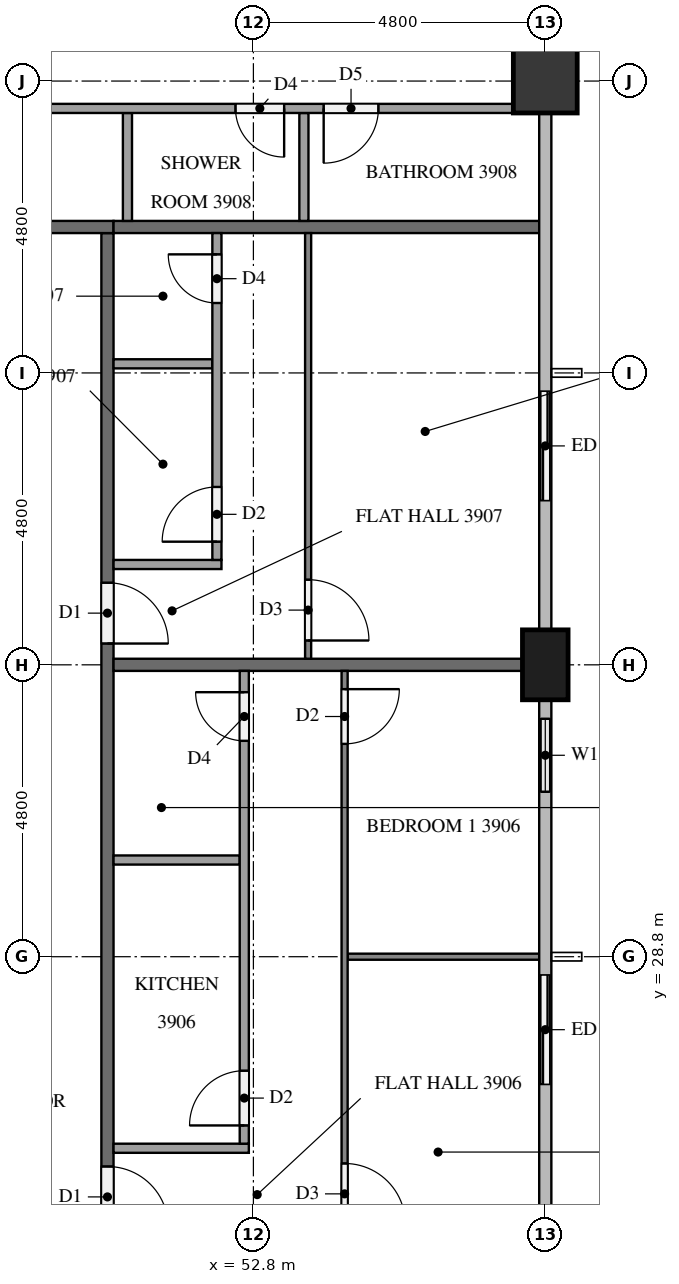
"""IFC4 building model, lengths in metres.
Left out: names, types, materials, properties, quantities, classifications, styles, units other than length and angle.
Written with IfcOpenShell. Run it as: python <this file> out.ifc"""

import sys

from ifc_helpers import new_model, si_unit, direction, frame, frame_2d, origin, origin_2d, place, context, subcontext, project, spatial, rectangle, extrude, element, fill, save


model = new_model("IFC4")
c1 = context("Model", 3, precision=1e-05, world=origin(), true_north=direction((0.0, 1.0)))
c2 = subcontext(c1, "Body", "Model", "MODEL_VIEW")
j1 = project(units=[si_unit("LENGTHUNIT", "METRE"), si_unit("PLANEANGLEUNIT", "RADIAN")], contexts=[c1])
p1 = place(None, origin())
s1 = spatial("IfcSite", under=j1, at=p1, CompositionType="ELEMENT")
p2 = place(p1, origin())
s2 = spatial("IfcBuilding", under=s1, at=p2, CompositionType="ELEMENT")
p3 = place(p2, frame((0.0, 0.0, 152.5)))
s3 = spatial("IfcBuildingStorey", under=s2, at=p3, CompositionType="ELEMENT", Elevation=152.5)
p4 = place(p3, frame((57.6, 33.6, 0.0), z_axis=(0.0, 0.0, 1.0), x_axis=(0.0, 1.0, 0.0)))
e1 = element("IfcColumn", 1, at=p4, inside=s3, PredefinedType="COLUMN", context=c2, shape_type="SweptSolid", body=[
    extrude(rectangle(XDim=1.15, YDim=0.75, at=origin_2d()), origin(), (0.0, 0.0, 1.0), 3.2),
])
p5 = place(p3, frame((57.6, 43.2, 0.0), z_axis=(0.0, 0.0, 1.0), x_axis=(1.0, 0.0, 0.0)))
e2 = element("IfcColumn", 2, at=p5, inside=s3, PredefinedType="COLUMN", context=c2, shape_type="SweptSolid", body=[
    extrude(rectangle(XDim=1.05, YDim=1.05, at=origin_2d()), origin(), (0.0, 0.0, 1.0), 3.2),
])
p6 = place(p3, frame((57.6, 26.4, 0.0), z_axis=(0.0, 0.0, 1.0), x_axis=(0.0, 1.0, 0.0)))
e3 = element("IfcWall", 3, at=p6, inside=s3, PredefinedType="SOLIDWALL", context=c2, shape_type="SweptSolid", body=[
    extrude(rectangle(XDim=2.4, YDim=0.15, at=frame_2d((1.2, 0.0))), origin(), (0.0, 0.0, 1.0), 3.2),
])
p7 = place(p6, frame((0.3, 0.0, 0.0)))
e4 = element("IfcOpeningElement", 4, at=p7, cuts=e3, PredefinedType="OPENING", context=c2, shape_type="SweptSolid", body=[
    extrude(rectangle(XDim=1.8, YDim=2.4, at=frame_2d((0.9, 1.2))), frame((0.0, 0.085, 0.0), z_axis=(0.0, -1.0, 0.0), x_axis=(1.0, 0.0, 0.0)), (0.0, 0.0, 1.0), 0.17),
])
p8 = place(p3, frame((57.6, 31.2, 0.0), z_axis=(0.0, 0.0, 1.0), x_axis=(0.0, 1.0, 0.0)))
e5 = element("IfcWall", 5, at=p8, inside=s3, PredefinedType="SOLIDWALL", context=c2, shape_type="SweptSolid", body=[
    extrude(rectangle(XDim=1.825, YDim=0.15, at=frame_2d((0.913, 0.0))), origin(), (0.0, 0.0, 1.0), 3.2),
])
p9 = place(p8, frame((0.312, 0.0, 0.9)))
e6 = element("IfcOpeningElement", 6, at=p9, cuts=e5, PredefinedType="OPENING", context=c2, shape_type="SweptSolid", body=[
    extrude(rectangle(XDim=1.2, YDim=1.4, at=frame_2d((0.6, 0.7))), frame((0.0, 0.085, 0.0), z_axis=(0.0, -1.0, 0.0), x_axis=(1.0, 0.0, 0.0)), (0.0, 0.0, 1.0), 0.17),
])
p10 = place(p3, frame((57.6, 36.0, 0.0), z_axis=(0.0, 0.0, 1.0), x_axis=(0.0, 1.0, 0.0)))
e7 = element("IfcWall", 7, at=p10, inside=s3, PredefinedType="SOLIDWALL", context=c2, shape_type="SweptSolid", body=[
    extrude(rectangle(XDim=2.4, YDim=0.15, at=frame_2d((1.2, 0.0))), origin(), (0.0, 0.0, 1.0), 3.2),
])
p11 = place(p10, frame((0.3, 0.0, 0.0)))
e8 = element("IfcOpeningElement", 8, at=p11, cuts=e7, PredefinedType="OPENING", context=c2, shape_type="SweptSolid", body=[
    extrude(rectangle(XDim=1.8, YDim=2.4, at=frame_2d((0.9, 1.2))), frame((0.0, 0.085, 0.0), z_axis=(0.0, -1.0, 0.0), x_axis=(1.0, 0.0, 0.0)), (0.0, 0.0, 1.0), 0.17),
])
p12 = place(p3, frame((50.4, 40.7, 0.0), z_axis=(0.0, 0.0, 1.0), x_axis=(0.0, -1.0, 0.0)))
e9 = element("IfcWall", 9, at=p12, inside=s3, PredefinedType="PARTITIONING", context=c2, shape_type="SweptSolid", body=[
    extrude(rectangle(XDim=28.6, YDim=0.2, at=frame_2d((14.3, 0.0))), origin(), (0.0, 0.0, 1.0), 3.2),
])
p13 = place(p12, frame((17.05, 0.0, 0.0)))
e10 = element("IfcOpeningElement", 10, at=p13, cuts=e9, PredefinedType="OPENING", context=c2, shape_type="SweptSolid", body=[
    extrude(rectangle(XDim=1.0, YDim=2.1, at=frame_2d((0.5, 1.05))), frame((0.0, 0.11, 0.0), z_axis=(0.0, -1.0, 0.0), x_axis=(1.0, 0.0, 0.0)), (0.0, 0.0, 1.0), 0.22),
])
p14 = place(p12, frame((15.35, 0.0, 0.0)))
e11 = element("IfcOpeningElement", 11, at=p14, cuts=e9, PredefinedType="OPENING", context=c2, shape_type="SweptSolid", body=[
    extrude(rectangle(XDim=1.0, YDim=2.1, at=frame_2d((0.5, 1.05))), frame((0.0, 0.11, 0.0), z_axis=(0.0, -1.0, 0.0), x_axis=(1.0, 0.0, 0.0)), (0.0, 0.0, 1.0), 0.22),
])
p15 = place(p12, frame((5.75, 0.0, 0.0)))
e12 = element("IfcOpeningElement", 12, at=p15, cuts=e9, PredefinedType="OPENING", context=c2, shape_type="SweptSolid", body=[
    extrude(rectangle(XDim=1.0, YDim=2.1, at=frame_2d((0.5, 1.05))), frame((0.0, 0.11, 0.0), z_axis=(0.0, -1.0, 0.0), x_axis=(1.0, 0.0, 0.0)), (0.0, 0.0, 1.0), 0.22),
])
p16 = place(p3, frame((11.9, 40.8, 0.0), z_axis=(0.0, 0.0, 1.0), x_axis=(1.0, 0.0, 0.0)))
e13 = element("IfcWall", 13, at=p16, inside=s3, PredefinedType="PARTITIONING", context=c2, shape_type="SweptSolid", body=[
    extrude(rectangle(XDim=38.6, YDim=0.2, at=frame_2d((19.3, 0.0))), origin(), (0.0, 0.0, 1.0), 3.2),
])
p17 = place(p16, frame((31.65, 0.0, 0.0)))
e14 = element("IfcOpeningElement", 14, at=p17, cuts=e13, PredefinedType="OPENING", context=c2, shape_type="SweptSolid", body=[
    extrude(rectangle(XDim=1.0, YDim=2.1, at=frame_2d((0.5, 1.05))), frame((0.0, 0.11, 0.0), z_axis=(0.0, -1.0, 0.0), x_axis=(1.0, 0.0, 0.0)), (0.0, 0.0, 1.0), 0.22),
])
p18 = place(p16, frame((29.95, 0.0, 0.0)))
e15 = element("IfcOpeningElement", 15, at=p18, cuts=e13, PredefinedType="OPENING", context=c2, shape_type="SweptSolid", body=[
    extrude(rectangle(XDim=1.0, YDim=2.1, at=frame_2d((0.5, 1.05))), frame((0.0, 0.11, 0.0), z_axis=(0.0, -1.0, 0.0), x_axis=(1.0, 0.0, 0.0)), (0.0, 0.0, 1.0), 0.22),
])
p19 = place(p16, frame((15.55, 0.0, 0.0)))
e16 = element("IfcOpeningElement", 16, at=p19, cuts=e13, PredefinedType="OPENING", context=c2, shape_type="SweptSolid", body=[
    extrude(rectangle(XDim=1.0, YDim=2.1, at=frame_2d((0.5, 1.05))), frame((0.0, 0.11, 0.0), z_axis=(0.0, -1.0, 0.0), x_axis=(1.0, 0.0, 0.0)), (0.0, 0.0, 1.0), 0.22),
])
p20 = place(p16, frame((1.15, 0.0, 0.0)))
e17 = element("IfcOpeningElement", 17, at=p20, cuts=e13, PredefinedType="OPENING", context=c2, shape_type="SweptSolid", body=[
    extrude(rectangle(XDim=1.0, YDim=2.1, at=frame_2d((0.5, 1.05))), frame((0.0, 0.11, 0.0), z_axis=(0.0, -1.0, 0.0), x_axis=(1.0, 0.0, 0.0)), (0.0, 0.0, 1.0), 0.22),
])
p21 = place(p3, frame((50.5, 33.6, 0.0), z_axis=(0.0, 0.0, 1.0), x_axis=(1.0, 0.0, 0.0)))
e18 = element("IfcWall", 18, at=p21, inside=s3, PredefinedType="PARTITIONING", context=c2, shape_type="SweptSolid", body=[
    extrude(rectangle(XDim=6.725, YDim=0.2, at=frame_2d((3.363, 0.0))), origin(), (0.0, 0.0, 1.0), 3.2),
])
p22 = place(p3, frame((50.5, 40.8, 0.0), z_axis=(0.0, 0.0, 1.0), x_axis=(1.0, 0.0, 0.0)))
e19 = element("IfcWall", 19, at=p22, inside=s3, PredefinedType="PARTITIONING", context=c2, shape_type="SweptSolid", body=[
    extrude(rectangle(XDim=7.0, YDim=0.2, at=frame_2d((3.5, 0.0))), origin(), (0.0, 0.0, 1.0), 3.2),
])
p23 = place(p3, frame((54.35, 28.8, 0.0), z_axis=(0.0, 0.0, 1.0), x_axis=(1.0, 0.0, 0.0)))
e20 = element("IfcWall", 20, at=p23, inside=s3, PredefinedType="PARTITIONING", context=c2, shape_type="SweptSolid", body=[
    extrude(rectangle(XDim=3.15, YDim=0.1, at=frame_2d((1.575, 0.0))), origin(), (0.0, 0.0, 1.0), 3.2),
])
p24 = place(p3, frame((54.3, 33.5, 0.0), z_axis=(0.0, 0.0, 1.0), x_axis=(0.0, -1.0, 0.0)))
e21 = element("IfcWall", 21, at=p24, inside=s3, PredefinedType="PARTITIONING", context=c2, shape_type="SweptSolid", body=[
    extrude(rectangle(XDim=9.4, YDim=0.1, at=frame_2d((4.7, 0.0))), origin(), (0.0, 0.0, 1.0), 3.2),
])
p25 = place(p24, frame((8.1, 0.0, 0.0)))
e22 = element("IfcOpeningElement", 22, at=p25, cuts=e21, PredefinedType="OPENING", context=c2, shape_type="SweptSolid", body=[
    extrude(rectangle(XDim=1.0, YDim=2.1, at=frame_2d((0.5, 1.05))), frame((0.0, 0.06, 0.0), z_axis=(0.0, -1.0, 0.0), x_axis=(1.0, 0.0, 0.0)), (0.0, 0.0, 1.0), 0.12),
])
p26 = place(p24, frame((0.3, 0.0, 0.0)))
e23 = element("IfcOpeningElement", 23, at=p26, cuts=e21, PredefinedType="OPENING", context=c2, shape_type="SweptSolid", body=[
    extrude(rectangle(XDim=0.9, YDim=2.1, at=frame_2d((0.45, 1.05))), frame((0.0, 0.06, 0.0), z_axis=(0.0, -1.0, 0.0), x_axis=(1.0, 0.0, 0.0)), (0.0, 0.0, 1.0), 0.12),
])
p27 = place(p3, frame((50.5, 30.39, 0.0), z_axis=(0.0, 0.0, 1.0), x_axis=(1.0, 0.0, 0.0)))
e24 = element("IfcWall", 24, at=p27, inside=s3, PredefinedType="PARTITIONING", context=c2, shape_type="SweptSolid", body=[
    extrude(rectangle(XDim=2.075, YDim=0.15, at=frame_2d((1.038, 0.0))), origin(), (0.0, 0.0, 1.0), 3.2),
])
p28 = place(p3, frame((50.5, 25.65, 0.0), z_axis=(0.0, 0.0, 1.0), x_axis=(1.0, 0.0, 0.0)))
e25 = element("IfcWall", 25, at=p28, inside=s3, PredefinedType="PARTITIONING", context=c2, shape_type="SweptSolid", body=[
    extrude(rectangle(XDim=2.225, YDim=0.15, at=frame_2d((1.113, 0.0))), origin(), (0.0, 0.0, 1.0), 3.2),
])
p29 = place(p3, frame((52.65, 25.725, 0.0), z_axis=(0.0, 0.0, 1.0), x_axis=(0.0, 1.0, 0.0)))
e26 = element("IfcWall", 26, at=p29, inside=s3, PredefinedType="PARTITIONING", context=c2, shape_type="SweptSolid", body=[
    extrude(rectangle(XDim=7.775, YDim=0.15, at=frame_2d((3.887, 0.0))), origin(), (0.0, 0.0, 1.0), 3.2),
])
p30 = place(p29, frame((0.3, 0.0, 0.0)))
e27 = element("IfcOpeningElement", 27, at=p30, cuts=e26, PredefinedType="OPENING", context=c2, shape_type="SweptSolid", body=[
    extrude(rectangle(XDim=0.9, YDim=2.1, at=frame_2d((0.45, 1.05))), frame((0.0, 0.085, 0.0), z_axis=(0.0, -1.0, 0.0), x_axis=(1.0, 0.0, 0.0)), (0.0, 0.0, 1.0), 0.17),
])
p31 = place(p29, frame((6.625, 0.0, 0.0)))
e28 = element("IfcOpeningElement", 28, at=p31, cuts=e26, PredefinedType="OPENING", context=c2, shape_type="SweptSolid", body=[
    extrude(rectangle(XDim=0.8, YDim=2.1, at=frame_2d((0.4, 1.05))), frame((0.0, 0.085, 0.0), z_axis=(0.0, -1.0, 0.0), x_axis=(1.0, 0.0, 0.0)), (0.0, 0.0, 1.0), 0.17),
])
p32 = place(p3, frame((53.7, 40.7, 0.0), z_axis=(0.0, 0.0, 1.0), x_axis=(0.0, -1.0, 0.0)))
e29 = element("IfcWall", 29, at=p32, inside=s3, PredefinedType="PARTITIONING", context=c2, shape_type="SweptSolid", body=[
    extrude(rectangle(XDim=7.0, YDim=0.1, at=frame_2d((3.5, 0.0))), origin(), (0.0, 0.0, 1.0), 3.2),
])
p33 = place(p32, frame((5.7, 0.0, 0.0)))
e30 = element("IfcOpeningElement", 30, at=p33, cuts=e29, PredefinedType="OPENING", context=c2, shape_type="SweptSolid", body=[
    extrude(rectangle(XDim=1.0, YDim=2.1, at=frame_2d((0.5, 1.05))), frame((0.0, 0.06, 0.0), z_axis=(0.0, -1.0, 0.0), x_axis=(1.0, 0.0, 0.0)), (0.0, 0.0, 1.0), 0.12),
])
p34 = place(p3, frame((50.5, 38.55, 0.0), z_axis=(0.0, 0.0, 1.0), x_axis=(1.0, 0.0, 0.0)))
e31 = element("IfcWall", 31, at=p34, inside=s3, PredefinedType="PARTITIONING", context=c2, shape_type="SweptSolid", body=[
    extrude(rectangle(XDim=1.625, YDim=0.15, at=frame_2d((0.812, 0.0))), origin(), (0.0, 0.0, 1.0), 3.2),
])
p35 = place(p3, frame((50.5, 35.25, 0.0), z_axis=(0.0, 0.0, 1.0), x_axis=(1.0, 0.0, 0.0)))
e32 = element("IfcWall", 32, at=p35, inside=s3, PredefinedType="PARTITIONING", context=c2, shape_type="SweptSolid", body=[
    extrude(rectangle(XDim=1.775, YDim=0.15, at=frame_2d((0.887, 0.0))), origin(), (0.0, 0.0, 1.0), 3.2),
])
p36 = place(p3, frame((52.2, 35.325, 0.0), z_axis=(0.0, 0.0, 1.0), x_axis=(0.0, 1.0, 0.0)))
e33 = element("IfcWall", 33, at=p36, inside=s3, PredefinedType="PARTITIONING", context=c2, shape_type="SweptSolid", body=[
    extrude(rectangle(XDim=5.375, YDim=0.15, at=frame_2d((2.688, 0.0))), origin(), (0.0, 0.0, 1.0), 3.2),
])
p37 = place(p36, frame((0.3, 0.0, 0.0)))
e34 = element("IfcOpeningElement", 34, at=p37, cuts=e33, PredefinedType="OPENING", context=c2, shape_type="SweptSolid", body=[
    extrude(rectangle(XDim=0.9, YDim=2.1, at=frame_2d((0.45, 1.05))), frame((0.0, 0.085, 0.0), z_axis=(0.0, -1.0, 0.0), x_axis=(1.0, 0.0, 0.0)), (0.0, 0.0, 1.0), 0.17),
])
p38 = place(p36, frame((4.225, 0.0, 0.0)))
e35 = element("IfcOpeningElement", 35, at=p38, cuts=e33, PredefinedType="OPENING", context=c2, shape_type="SweptSolid", body=[
    extrude(rectangle(XDim=0.8, YDim=2.1, at=frame_2d((0.4, 1.05))), frame((0.0, 0.085, 0.0), z_axis=(0.0, -1.0, 0.0), x_axis=(1.0, 0.0, 0.0)), (0.0, 0.0, 1.0), 0.17),
])
for number, where, z_axis, x_axis in (
    (36, (50.729, 40.9, 0.0), (0.0, 0.0, 1.0), (0.0, 1.0, 0.0)),
    (37, (53.631, 40.9, 0.0), (0.0, 0.0, 1.0), (0.0, 1.0, 0.0)),
):
    element("IfcWall", number, at=place(p3, frame(where, z_axis=z_axis, x_axis=x_axis)), inside=s3, PredefinedType="PARTITIONING", context=c2, shape_type="SweptSolid", body=[
        extrude(rectangle(XDim=1.775, YDim=0.15, at=frame_2d((0.888, 0.0))), origin(), (0.0, 0.0, 1.0), 3.2),
    ])
p39 = place(p3, frame((57.075, 42.75, 0.0), z_axis=(0.0, 0.0, 1.0), x_axis=(-1.0, 0.0, 0.0)))
e38 = element("IfcWall", 38, at=p39, inside=s3, PredefinedType="PARTITIONING", context=c2, shape_type="SweptSolid", body=[
    extrude(rectangle(XDim=12.15, YDim=0.15, at=frame_2d((6.075, 0.0))), origin(), (0.0, 0.0, 1.0), 3.2),
])
p40 = place(p39, frame((10.95, 0.0, 0.0)))
e39 = element("IfcOpeningElement", 39, at=p40, cuts=e38, PredefinedType="OPENING", context=c2, shape_type="SweptSolid", body=[
    extrude(rectangle(XDim=0.9, YDim=2.1, at=frame_2d((0.45, 1.05))), frame((0.0, 0.085, 0.0), z_axis=(0.0, -1.0, 0.0), x_axis=(1.0, 0.0, 0.0)), (0.0, 0.0, 1.0), 0.17),
])
p41 = place(p39, frame((3.769, 0.0, 0.0)))
e40 = element("IfcOpeningElement", 40, at=p41, cuts=e38, PredefinedType="OPENING", context=c2, shape_type="SweptSolid", body=[
    extrude(rectangle(XDim=0.8, YDim=2.1, at=frame_2d((0.4, 1.05))), frame((0.0, 0.085, 0.0), z_axis=(0.0, -1.0, 0.0), x_axis=(1.0, 0.0, 0.0)), (0.0, 0.0, 1.0), 0.17),
])
p42 = place(p39, frame((2.219, 0.0, 0.0)))
e41 = element("IfcOpeningElement", 41, at=p42, cuts=e38, PredefinedType="OPENING", context=c2, shape_type="SweptSolid", body=[
    extrude(rectangle(XDim=0.9, YDim=2.1, at=frame_2d((0.45, 1.05))), frame((0.0, 0.085, 0.0), z_axis=(0.0, -1.0, 0.0), x_axis=(1.0, 0.0, 0.0)), (0.0, 0.0, 1.0), 0.17),
])
p43 = place(p7, origin())
e42 = element("IfcDoor", 42, at=p43, inside=s3, OperationType="SLIDING_TO_RIGHT", PredefinedType="DOOR", context=c2, shape_type="SweptSolid", body=[
    extrude(rectangle(XDim=1.8, YDim=2.4, at=frame_2d((0.9, 1.2))), frame((0.0, 0.025, 0.0), z_axis=(0.0, -1.0, 0.0), x_axis=(1.0, 0.0, 0.0)), (0.0, 0.0, 1.0), 0.05),
])
fill(e4, e42)
p44 = place(p9, origin())
e43 = element("IfcWindow", 43, at=p44, inside=s3, PartitioningType="SINGLE_PANEL", PredefinedType="WINDOW", context=c2, shape_type="SweptSolid", body=[
    extrude(rectangle(XDim=1.2, YDim=1.4, at=frame_2d((0.6, 0.7))), frame((0.0, 0.03, 0.0), z_axis=(0.0, -1.0, 0.0), x_axis=(1.0, 0.0, 0.0)), (0.0, 0.0, 1.0), 0.06),
])
fill(e6, e43)
p45 = place(p11, origin())
e44 = element("IfcDoor", 44, at=p45, inside=s3, OperationType="SLIDING_TO_LEFT", PredefinedType="DOOR", context=c2, shape_type="SweptSolid", body=[
    extrude(rectangle(XDim=1.8, YDim=2.4, at=frame_2d((0.9, 1.2))), frame((0.0, 0.025, 0.0), z_axis=(0.0, -1.0, 0.0), x_axis=(1.0, 0.0, 0.0)), (0.0, 0.0, 1.0), 0.05),
])
fill(e8, e44)
p46 = place(p14, origin())
e45 = element("IfcDoor", 45, at=p46, inside=s3, OperationType="SINGLE_SWING_RIGHT", PredefinedType="DOOR", context=c2, shape_type="SweptSolid", body=[
    extrude(rectangle(XDim=1.0, YDim=2.1, at=frame_2d((0.5, 1.05))), frame((0.0, 0.025, 0.0), z_axis=(0.0, -1.0, 0.0), x_axis=(1.0, 0.0, 0.0)), (0.0, 0.0, 1.0), 0.05),
])
fill(e11, e45)
p47 = place(p15, origin())
e46 = element("IfcDoor", 46, at=p47, inside=s3, OperationType="SINGLE_SWING_RIGHT", PredefinedType="DOOR", context=c2, shape_type="SweptSolid", body=[
    extrude(rectangle(XDim=1.0, YDim=2.1, at=frame_2d((0.5, 1.05))), frame((0.0, 0.025, 0.0), z_axis=(0.0, -1.0, 0.0), x_axis=(1.0, 0.0, 0.0)), (0.0, 0.0, 1.0), 0.05),
])
fill(e12, e46)
p48 = place(p25, origin())
e47 = element("IfcDoor", 47, at=p48, inside=s3, OperationType="SINGLE_SWING_RIGHT", PredefinedType="DOOR", context=c2, shape_type="SweptSolid", body=[
    extrude(rectangle(XDim=1.0, YDim=2.1, at=frame_2d((0.5, 1.05))), frame((0.0, 0.025, 0.0), z_axis=(0.0, -1.0, 0.0), x_axis=(1.0, 0.0, 0.0)), (0.0, 0.0, 1.0), 0.05),
])
fill(e22, e47)
p49 = place(p26, origin())
e48 = element("IfcDoor", 48, at=p49, inside=s3, OperationType="SINGLE_SWING_LEFT", PredefinedType="DOOR", context=c2, shape_type="SweptSolid", body=[
    extrude(rectangle(XDim=0.9, YDim=2.1, at=frame_2d((0.45, 1.05))), frame((0.0, 0.025, 0.0), z_axis=(0.0, -1.0, 0.0), x_axis=(1.0, 0.0, 0.0)), (0.0, 0.0, 1.0), 0.05),
])
fill(e23, e48)
p50 = place(p30, origin())
e49 = element("IfcDoor", 49, at=p50, inside=s3, OperationType="SINGLE_SWING_LEFT", PredefinedType="DOOR", context=c2, shape_type="SweptSolid", body=[
    extrude(rectangle(XDim=0.9, YDim=2.1, at=frame_2d((0.45, 1.05))), frame((0.0, 0.025, 0.0), z_axis=(0.0, -1.0, 0.0), x_axis=(1.0, 0.0, 0.0)), (0.0, 0.0, 1.0), 0.05),
])
fill(e27, e49)
p51 = place(p31, origin())
e50 = element("IfcDoor", 50, at=p51, inside=s3, OperationType="SINGLE_SWING_RIGHT", PredefinedType="DOOR", context=c2, shape_type="SweptSolid", body=[
    extrude(rectangle(XDim=0.8, YDim=2.1, at=frame_2d((0.4, 1.05))), frame((0.0, 0.025, 0.0), z_axis=(0.0, -1.0, 0.0), x_axis=(1.0, 0.0, 0.0)), (0.0, 0.0, 1.0), 0.05),
])
fill(e28, e50)
p52 = place(p33, origin())
e51 = element("IfcDoor", 51, at=p52, inside=s3, OperationType="SINGLE_SWING_RIGHT", PredefinedType="DOOR", context=c2, shape_type="SweptSolid", body=[
    extrude(rectangle(XDim=1.0, YDim=2.1, at=frame_2d((0.5, 1.05))), frame((0.0, 0.025, 0.0), z_axis=(0.0, -1.0, 0.0), x_axis=(1.0, 0.0, 0.0)), (0.0, 0.0, 1.0), 0.05),
])
fill(e30, e51)
p53 = place(p37, origin())
e52 = element("IfcDoor", 52, at=p53, inside=s3, OperationType="SINGLE_SWING_LEFT", PredefinedType="DOOR", context=c2, shape_type="SweptSolid", body=[
    extrude(rectangle(XDim=0.9, YDim=2.1, at=frame_2d((0.45, 1.05))), frame((0.0, 0.025, 0.0), z_axis=(0.0, -1.0, 0.0), x_axis=(1.0, 0.0, 0.0)), (0.0, 0.0, 1.0), 0.05),
])
fill(e34, e52)
p54 = place(p38, origin())
e53 = element("IfcDoor", 53, at=p54, inside=s3, OperationType="SINGLE_SWING_RIGHT", PredefinedType="DOOR", context=c2, shape_type="SweptSolid", body=[
    extrude(rectangle(XDim=0.8, YDim=2.1, at=frame_2d((0.4, 1.05))), frame((0.0, 0.025, 0.0), z_axis=(0.0, -1.0, 0.0), x_axis=(1.0, 0.0, 0.0)), (0.0, 0.0, 1.0), 0.05),
])
fill(e35, e53)
p55 = place(p41, origin())
e54 = element("IfcDoor", 54, at=p55, inside=s3, OperationType="SINGLE_SWING_LEFT", PredefinedType="DOOR", context=c2, shape_type="SweptSolid", body=[
    extrude(rectangle(XDim=0.8, YDim=2.1, at=frame_2d((0.4, 1.05))), frame((0.0, 0.025, 0.0), z_axis=(0.0, -1.0, 0.0), x_axis=(1.0, 0.0, 0.0)), (0.0, 0.0, 1.0), 0.05),
])
fill(e40, e54)
p56 = place(p42, origin())
e55 = element("IfcDoor", 55, at=p56, inside=s3, OperationType="SINGLE_SWING_RIGHT", PredefinedType="DOOR", context=c2, shape_type="SweptSolid", body=[
    extrude(rectangle(XDim=0.9, YDim=2.1, at=frame_2d((0.45, 1.05))), frame((0.0, 0.025, 0.0), z_axis=(0.0, -1.0, 0.0), x_axis=(1.0, 0.0, 0.0)), (0.0, 0.0, 1.0), 0.05),
])
fill(e41, e55)
save(model, sys.argv[1])
